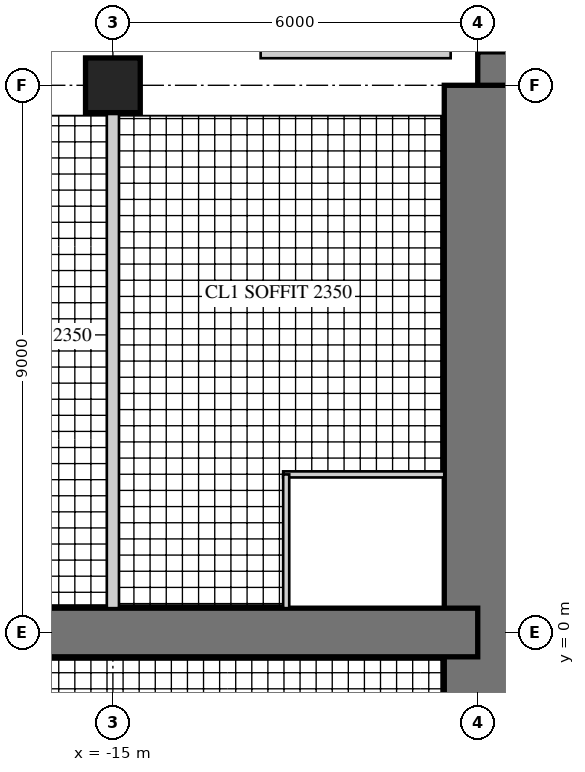
"""IFC4 building model, lengths in metres.
Left out: names, types, materials, properties, quantities, classifications, styles, units other than length and angle.
Written with IfcOpenShell. Run it as: python <this file> out.ifc"""

import sys

from ifc_helpers import new_model, si_unit, direction, frame, frame_2d, origin, origin_2d, place, context, subcontext, project, spatial, rectangle, hollow_rectangle, extrude, element, fill, save


model = new_model("IFC4")
c1 = context("Model", 3, precision=1e-05, world=origin(), true_north=direction((0.0, 1.0)))
c2 = subcontext(c1, "Body", "Model", "MODEL_VIEW")
j1 = project(units=[si_unit("LENGTHUNIT", "METRE"), si_unit("PLANEANGLEUNIT", "RADIAN")], contexts=[c1])
p1 = place(None, origin())
s1 = spatial("IfcSite", under=j1, at=p1, CompositionType="ELEMENT")
p2 = place(p1, origin())
s2 = spatial("IfcBuilding", under=s1, at=p2, CompositionType="ELEMENT")
p3 = place(p2, frame((0.0, 0.0, 172.9)))
s3 = spatial("IfcBuildingStorey", under=s2, at=p3, CompositionType="ELEMENT", Elevation=172.9)
p4 = place(p3, frame((9.0, 9.0, 0.0), z_axis=(0.0, 0.0, 1.0), x_axis=(-1.0, 0.0, 0.0)))
e1 = element("IfcWall", 1, at=p4, inside=s3, PredefinedType="SHEAR", context=c2, shape_type="SweptSolid", body=[
    extrude(rectangle(XDim=18.0, YDim=1.1, at=frame_2d((9.0, 0.0))), origin(), (0.0, 0.0, 1.0), 3.4),
])
p5 = place(p4, frame((9.8, 0.0, 0.0)))
e2 = element("IfcOpeningElement", 2, at=p5, cuts=e1, PredefinedType="OPENING", context=c2, shape_type="SweptSolid", body=[
    extrude(rectangle(XDim=1.0, YDim=2.4, at=frame_2d((0.5, 1.2))), frame((0.0, 0.56, 0.0), z_axis=(0.0, -1.0, 0.0), x_axis=(1.0, 0.0, 0.0)), (0.0, 0.0, 1.0), 1.12),
])
p6 = place(p3, frame((-9.0, 9.0, 0.0), z_axis=(0.0, 0.0, 1.0), x_axis=(0.0, -1.0, 0.0)))
e3 = element("IfcWall", 3, at=p6, inside=s3, PredefinedType="SHEAR", context=c2, shape_type="SweptSolid", body=[
    extrude(rectangle(XDim=18.0, YDim=1.1, at=frame_2d((9.0, 0.0))), origin(), (0.0, 0.0, 1.0), 3.4),
])
p7 = place(p6, frame((9.8, 0.0, 0.0)))
e4 = element("IfcOpeningElement", 4, at=p7, cuts=e3, PredefinedType="OPENING", context=c2, shape_type="SweptSolid", body=[
    extrude(rectangle(XDim=1.0, YDim=2.4, at=frame_2d((0.5, 1.2))), frame((0.0, 0.56, 0.0), z_axis=(0.0, -1.0, 0.0), x_axis=(1.0, 0.0, 0.0)), (0.0, 0.0, 1.0), 1.12),
])
p8 = place(p3, frame((-9.0, 0.0, 0.0), z_axis=(0.0, 0.0, 1.0), x_axis=(-1.0, 0.0, 0.0)))
e5 = element("IfcWall", 5, at=p8, inside=s3, PredefinedType="SHEAR", context=c2, shape_type="SweptSolid", body=[
    extrude(rectangle(XDim=18.0, YDim=0.8, at=frame_2d((9.0, 0.0))), origin(), (0.0, 0.0, 1.0), 3.4),
])
p9 = place(p8, frame((3.95, 0.0, 0.0)))
e6 = element("IfcOpeningElement", 6, at=p9, cuts=e5, PredefinedType="OPENING", context=c2, shape_type="SweptSolid", body=[
    extrude(rectangle(XDim=1.0, YDim=2.15, at=frame_2d((0.5, 1.075))), frame((0.0, 0.41, 0.0), z_axis=(0.0, -1.0, 0.0), x_axis=(1.0, 0.0, 0.0)), (0.0, 0.0, 1.0), 0.82),
])
p10 = place(p8, frame((6.6, 0.0, 0.0)))
e7 = element("IfcOpeningElement", 7, at=p10, cuts=e5, PredefinedType="OPENING", context=c2, shape_type="SweptSolid", body=[
    extrude(rectangle(XDim=1.0, YDim=2.15, at=frame_2d((0.5, 1.075))), frame((0.0, 0.41, 0.0), z_axis=(0.0, -1.0, 0.0), x_axis=(1.0, 0.0, 0.0)), (0.0, 0.0, 1.0), 0.82),
])
p11 = place(p8, frame((13.25, 0.0, 0.0)))
e8 = element("IfcOpeningElement", 8, at=p11, cuts=e5, PredefinedType="OPENING", context=c2, shape_type="SweptSolid", body=[
    extrude(rectangle(XDim=1.0, YDim=2.2, at=frame_2d((0.5, 1.1))), frame((0.0, 0.41, 0.0), z_axis=(0.0, -1.0, 0.0), x_axis=(1.0, 0.0, 0.0)), (0.0, 0.0, 1.0), 0.82),
])
p12 = place(p3, frame((-15.0, 9.0, 0.0), z_axis=(0.0, 0.0, 1.0), x_axis=(1.0, 0.0, 0.0)))
e9 = element("IfcColumn", 9, at=p12, inside=s3, PredefinedType="COLUMN", context=c2, shape_type="SweptSolid", body=[
    extrude(rectangle(XDim=0.9, YDim=0.9, at=origin_2d()), origin(), (0.0, 0.0, 1.0), 3.4),
])
p13 = place(p3, frame((-9.445, 9.57, 0.0), z_axis=(0.0, 0.0, 1.0), x_axis=(-1.0, 0.0, 0.0)))
e10 = element("IfcWall", 10, at=p13, inside=s3, PredefinedType="SOLIDWALL", context=c2, shape_type="SweptSolid", body=[
    extrude(rectangle(XDim=3.125, YDim=0.25, at=frame_2d((1.562, 0.0))), origin(), (0.0, 0.0, 1.0), 3.22),
])
p14 = place(p13, frame((0.6, 0.0, 0.0)))
e11 = element("IfcOpeningElement", 11, at=p14, cuts=e10, PredefinedType="OPENING", context=c2, shape_type="SweptSolid", body=[
    extrude(rectangle(XDim=1.0, YDim=2.2, at=frame_2d((0.5, 1.1))), frame((0.0, 0.135, 0.0), z_axis=(0.0, -1.0, 0.0), x_axis=(1.0, 0.0, 0.0)), (0.0, 0.0, 1.0), 0.27),
])
p15 = place(p3, frame((-9.55, 2.6, 0.0), z_axis=(0.0, 0.0, 1.0), x_axis=(-1.0, 0.0, 0.0)))
e12 = element("IfcWall", 12, at=p15, inside=s3, PredefinedType="PARTITIONING", context=c2, shape_type="SweptSolid", body=[
    extrude(rectangle(XDim=2.65, YDim=0.1, at=frame_2d((1.325, 0.0))), origin(), (0.0, 0.0, 1.0), 3.22),
])
p16 = place(p3, frame((-12.15, 2.6, 0.0), z_axis=(0.0, 0.0, 1.0), x_axis=(0.0, -1.0, 0.0)))
e13 = element("IfcWall", 13, at=p16, inside=s3, PredefinedType="PARTITIONING", context=c2, shape_type="SweptSolid", body=[
    extrude(rectangle(XDim=2.2, YDim=0.1, at=frame_2d((1.1, 0.0))), origin(), (0.0, 0.0, 1.0), 3.22),
])
p17 = place(p16, frame((0.55, 0.0, 0.0)))
e14 = element("IfcOpeningElement", 14, at=p17, cuts=e13, PredefinedType="OPENING", context=c2, shape_type="SweptSolid", body=[
    extrude(rectangle(XDim=0.9, YDim=2.1, at=frame_2d((0.45, 1.05))), frame((0.0, 0.06, 0.0), z_axis=(0.0, -1.0, 0.0), x_axis=(1.0, 0.0, 0.0)), (0.0, 0.0, 1.0), 0.12),
])
p18 = place(p3, frame((-15.0, 8.55, 0.0), z_axis=(0.0, 0.0, 1.0), x_axis=(0.0, -1.0, 0.0)))
e15 = element("IfcWall", 15, at=p18, inside=s3, PredefinedType="SOLIDWALL", context=c2, shape_type="SweptSolid", body=[
    extrude(rectangle(XDim=8.15, YDim=0.2, at=frame_2d((4.075, 0.0))), origin(), (0.0, 0.0, 1.0), 2.47),
])
p19 = place(p14, origin())
e16 = element("IfcDoor", 16, at=p19, inside=s3, OperationType="SINGLE_SWING_LEFT", PredefinedType="DOOR", context=c2, shape_type="SweptSolid", body=[
    extrude(hollow_rectangle(XDim=1.0, YDim=2.2, WallThickness=0.06, at=frame_2d((0.5, 1.1))), frame((0.0, 0.025, 0.0), z_axis=(0.0, -1.0, 0.0), x_axis=(1.0, 0.0, 0.0)), (0.0, 0.0, 1.0), 0.05),
    extrude(rectangle(XDim=0.879, YDim=2.079, at=frame_2d((0.5, 1.1))), frame((0.0, 0.025, 0.0), z_axis=(0.0, -1.0, 0.0), x_axis=(1.0, 0.0, 0.0)), (0.0, 0.0, 1.0), 0.05),
])
fill(e11, e16)
p20 = place(p17, origin())
e17 = element("IfcDoor", 17, at=p20, inside=s3, OperationType="SINGLE_SWING_LEFT", PredefinedType="DOOR", context=c2, shape_type="SweptSolid", body=[
    extrude(rectangle(XDim=0.9, YDim=2.1, at=frame_2d((0.45, 1.05))), frame((0.0, 0.025, 0.0), z_axis=(0.0, -1.0, 0.0), x_axis=(1.0, 0.0, 0.0)), (0.0, 0.0, 1.0), 0.05),
])
fill(e14, e17)
p21 = place(p9, frame((1.0, 0.0, 0.0), z_axis=(0.0, 0.0, 1.0), x_axis=(-1.0, 0.0, 0.0)))
e18 = element("IfcDoor", 18, at=p21, inside=s3, OperationType="SINGLE_SWING_RIGHT", PredefinedType="DOOR", context=c2, shape_type="SweptSolid", body=[
    extrude(rectangle(XDim=1.0, YDim=2.15, at=frame_2d((0.5, 1.075))), frame((0.0, 0.025, 0.0), z_axis=(0.0, -1.0, 0.0), x_axis=(1.0, 0.0, 0.0)), (0.0, 0.0, 1.0), 0.05),
])
fill(e6, e18)
p22 = place(p10, frame((1.0, 0.0, 0.0), z_axis=(0.0, 0.0, 1.0), x_axis=(-1.0, 0.0, 0.0)))
e19 = element("IfcDoor", 19, at=p22, inside=s3, OperationType="SINGLE_SWING_RIGHT", PredefinedType="DOOR", context=c2, shape_type="SweptSolid", body=[
    extrude(rectangle(XDim=1.0, YDim=2.15, at=frame_2d((0.5, 1.075))), frame((0.0, 0.025, 0.0), z_axis=(0.0, -1.0, 0.0), x_axis=(1.0, 0.0, 0.0)), (0.0, 0.0, 1.0), 0.05),
])
fill(e7, e19)
p23 = place(p7, origin())
e20 = element("IfcDoor", 20, at=p23, inside=s3, OperationType="SINGLE_SWING_RIGHT", PredefinedType="DOOR", context=c2, shape_type="SweptSolid", body=[
    extrude(rectangle(XDim=1.0, YDim=2.4, at=frame_2d((0.5, 1.2))), frame((0.0, 0.055, 0.0), z_axis=(0.0, -1.0, 0.0), x_axis=(1.0, 0.0, 0.0)), (0.0, 0.0, 1.0), 0.05),
])
fill(e4, e20)
save(model, sys.argv[1])
